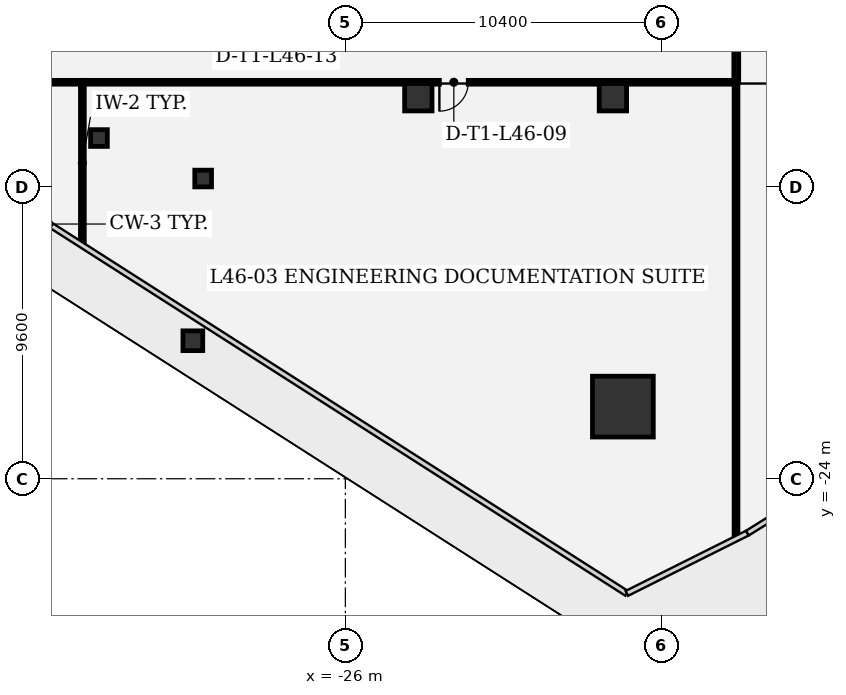
"""IFC4 building model, lengths in metres.
Left out: names, types, materials, properties, quantities, classifications, styles, units other than length and angle.
Written with IfcOpenShell. Run it as: python <this file> out.ifc"""

import sys

from ifc_helpers import new_model, si_unit, direction, frame, frame_2d, origin, origin_2d, place, context, subcontext, project, spatial, rectangle, extrude, element, fill, save


model = new_model("IFC4")
c1 = context("Model", 3, precision=1e-05, world=origin(), true_north=direction((0.0, 1.0)))
c2 = subcontext(c1, "Body", "Model", "MODEL_VIEW")
j1 = project(units=[si_unit("LENGTHUNIT", "METRE"), si_unit("PLANEANGLEUNIT", "RADIAN")], contexts=[c1])
p1 = place(None, origin())
s1 = spatial("IfcSite", under=j1, at=p1, CompositionType="ELEMENT")
p2 = place(p1, origin())
s2 = spatial("IfcBuilding", under=s1, at=p2, CompositionType="ELEMENT")
p3 = place(p2, frame((0.0, 0.0, 201.0)))
s3 = spatial("IfcBuildingStorey", under=s2, at=p3, CompositionType="ELEMENT", Elevation=201.0)
p4 = place(p3, frame((-16.872, -21.627, 0.0), z_axis=(0.0, 0.0, 1.0), x_axis=(1.0, 0.0, 0.0)))
e1 = element("IfcColumn", 1, at=p4, inside=s3, PredefinedType="COLUMN", context=c2, shape_type="SweptSolid", body=[
    extrude(rectangle(XDim=2.0, YDim=2.0, at=origin_2d()), origin(), (0.0, 0.0, 1.0), 4.05),
])
for number, where, z_axis, x_axis in (
    (2, (-17.2, -11.45, 0.0), (0.0, 0.0, 1.0), (1.0, 0.0, 0.0)),
    (3, (-23.6, -11.45, 0.0), (0.0, 0.0, 1.0), (1.0, 0.0, 0.0)),
):
    element("IfcColumn", number, at=place(p3, frame(where, z_axis=z_axis, x_axis=x_axis)), inside=s3, PredefinedType="COLUMN", context=c2, shape_type="SweptSolid", body=[
        extrude(rectangle(XDim=0.9, YDim=0.9, at=origin_2d()), origin(), (0.0, 0.0, 1.0), 4.05),
    ])
p5 = place(p3, frame((-31.016, -19.46, 0.0), z_axis=(0.0, 0.0, 1.0), x_axis=(1.0, 0.0, 0.0)))
e4 = element("IfcColumn", 4, at=p5, inside=s3, PredefinedType="COLUMN", context=c2, shape_type="SweptSolid", body=[
    extrude(rectangle(XDim=0.65, YDim=0.65, at=origin_2d()), origin(), (0.0, 0.0, 1.0), 4.05),
])
for number, where, z_axis, x_axis in (
    (5, (-34.104, -12.792, 0.0), (0.0, 0.0, 1.0), (1.0, 0.0, 0.0)),
    (6, (-30.677, -14.124, 0.0), (0.0, 0.0, 1.0), (1.0, 0.0, 0.0)),
):
    element("IfcColumn", number, at=place(p3, frame(where, z_axis=z_axis, x_axis=x_axis)), inside=s3, PredefinedType="COLUMN", context=c2, shape_type="SweptSolid", body=[
        extrude(rectangle(XDim=0.55, YDim=0.55, at=origin_2d()), origin(), (0.0, 0.0, 1.0), 4.05),
    ])
p6 = place(p3, frame((-34.65, -16.246, 0.0), z_axis=(0.0, 0.0, 1.0), x_axis=(0.0, 1.0, 0.0)))
e7 = element("IfcWall", 7, at=p6, inside=s3, PredefinedType="PARTITIONING", context=c2, shape_type="SweptSolid", body=[
    extrude(rectangle(XDim=5.263, YDim=0.125, at=frame_2d((2.632, 0.0))), origin(), (0.0, 0.0, 1.0), 3.78),
])
p7 = place(p3, frame((-37.833, -10.958, 0.0), z_axis=(0.0, 0.0, 1.0), x_axis=(1.0, 0.0, 0.0)))
e8 = element("IfcWall", 8, at=p7, inside=s3, PredefinedType="PARTITIONING", context=c2, shape_type="SweptSolid", body=[
    extrude(rectangle(XDim=3.158, YDim=0.125, at=frame_2d((1.579, 0.0))), origin(), (0.0, 0.0, 1.0), 2.9),
])
p8 = place(p3, frame((-13.15, -25.895, 0.0), z_axis=(0.0, 0.0, 1.0), x_axis=(0.0, 1.0, 0.0)))
e9 = element("IfcWall", 9, at=p8, inside=s3, PredefinedType="PARTITIONING", context=c2, shape_type="SweptSolid", body=[
    extrude(rectangle(XDim=14.912, YDim=0.125, at=frame_2d((7.456, 0.0))), origin(), (0.0, 0.0, 1.0), 3.78),
])
p9 = place(p3, frame((-13.175, -10.958, 0.0), z_axis=(0.0, 0.0, 1.0), x_axis=(-1.0, 0.0, 0.0)))
e10 = element("IfcWall", 10, at=p9, inside=s3, PredefinedType="PARTITIONING", context=c2, shape_type="SweptSolid", body=[
    extrude(rectangle(XDim=21.442, YDim=0.125, at=frame_2d((10.721, 0.0))), origin(), (0.0, 0.0, 1.0), 2.9),
])
p10 = place(p9, frame((8.782, 0.0, 0.0)))
e11 = element("IfcOpeningElement", 11, at=p10, cuts=e10, PredefinedType="OPENING", context=c2, shape_type="SweptSolid", body=[
    extrude(rectangle(XDim=0.95, YDim=2.15, at=frame_2d((0.475, 1.075))), frame((0.0, 0.073, 0.0), z_axis=(0.0, -1.0, 0.0), x_axis=(1.0, 0.0, 0.0)), (0.0, 0.0, 1.0), 0.145),
])
p11 = place(p3, frame((-13.142, -1.333, 0.0), z_axis=(0.0, 0.0, 1.0), x_axis=(0.0, -1.0, 0.0)))
e12 = element("IfcWall", 12, at=p11, inside=s3, PredefinedType="PARTITIONING", context=c2, shape_type="SweptSolid", body=[
    extrude(rectangle(XDim=9.625, YDim=0.16, at=frame_2d((4.812, 0.0))), origin(), (0.0, 0.0, 1.0), 2.9),
])
p12 = place(p10, origin())
e13 = element("IfcDoor", 13, at=p12, inside=s3, OperationType="SINGLE_SWING_RIGHT", PredefinedType="DOOR", context=c2, shape_type="SweptSolid", body=[
    extrude(rectangle(XDim=0.95, YDim=2.15, at=frame_2d((0.475, 1.075))), frame((0.0, 0.025, 0.0), z_axis=(0.0, -1.0, 0.0), x_axis=(1.0, 0.0, 0.0)), (0.0, 0.0, 1.0), 0.05),
])
fill(e11, e13)
save(model, sys.argv[1])
